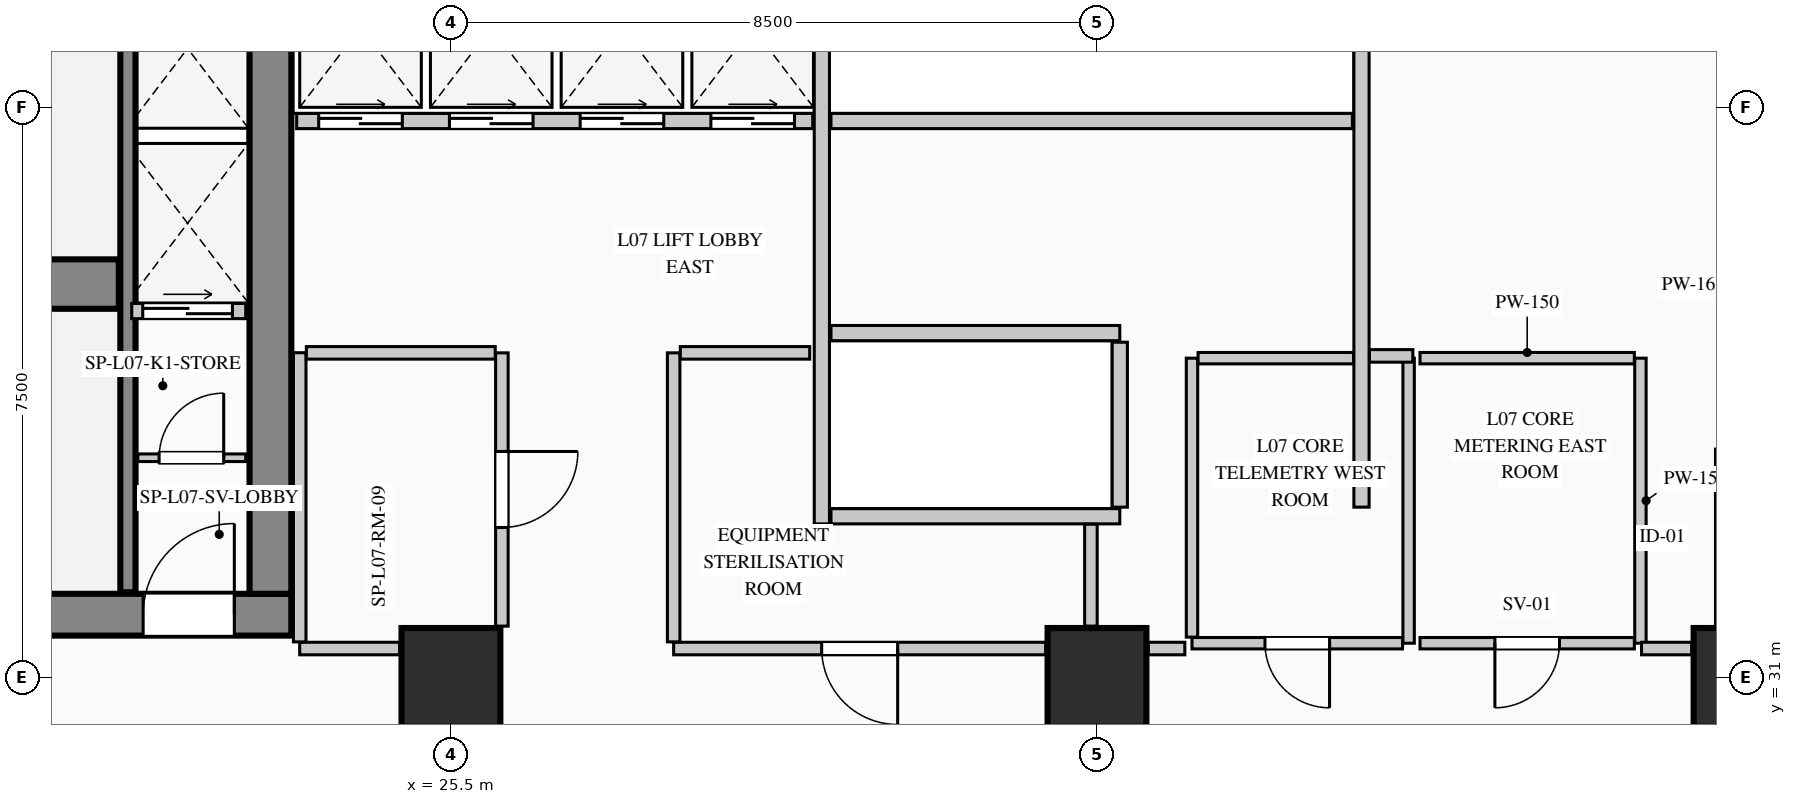
"""IFC4 building model, lengths in metres.
Left out: names, types, materials, properties, quantities, classifications, styles, units other than length and angle.
Written with IfcOpenShell. Run it as: python <this file> out.ifc"""

import sys

from ifc_helpers import new_model, si_unit, direction, frame, frame_2d, origin, origin_2d, place, context, subcontext, project, spatial, rectangle, extrude, element, fill, save


model = new_model("IFC4")
c1 = context("Model", 3, precision=1e-05, world=origin(), true_north=direction((0.0, 1.0)))
c2 = subcontext(c1, "Body", "Model", "MODEL_VIEW")
j1 = project(units=[si_unit("LENGTHUNIT", "METRE"), si_unit("PLANEANGLEUNIT", "RADIAN")], contexts=[c1])
p1 = place(None, origin())
s1 = spatial("IfcSite", under=j1, at=p1, CompositionType="ELEMENT")
p2 = place(p1, origin())
s2 = spatial("IfcBuilding", under=s1, at=p2, CompositionType="ELEMENT")
p3 = place(p2, frame((0.0, 0.0, 31.4)))
s3 = spatial("IfcBuildingStorey", under=s2, at=p3, CompositionType="ELEMENT", Elevation=31.4)
p4 = place(p3, frame((5.45, 31.825, 0.0), z_axis=(0.0, 0.0, 1.0), x_axis=(1.0, 0.0, 0.0)))
e1 = element("IfcWall", 1, at=p4, inside=s3, PredefinedType="SHEAR", context=c2, shape_type="SweptSolid", body=[
    extrude(rectangle(XDim=17.95, YDim=0.55, at=frame_2d((8.975, 0.0))), origin(), (0.0, 0.0, 1.0), 4.4),
])
p5 = place(p4, frame((3.2, 0.0, 0.0)))
e2 = element("IfcOpeningElement", 2, at=p5, cuts=e1, PredefinedType="OPENING", context=c2, shape_type="SweptSolid", body=[
    extrude(rectangle(XDim=1.2, YDim=2.2, at=frame_2d((0.6, 1.1))), frame((0.0, 0.285, 0.0), z_axis=(0.0, -1.0, 0.0), x_axis=(1.0, 0.0, 0.0)), (0.0, 0.0, 1.0), 0.57),
])
p6 = place(p4, frame((7.05, 0.0, 0.0)))
e3 = element("IfcOpeningElement", 3, at=p6, cuts=e1, PredefinedType="OPENING", context=c2, shape_type="SweptSolid", body=[
    extrude(rectangle(XDim=1.2, YDim=2.2, at=frame_2d((0.6, 1.1))), frame((0.0, 0.285, 0.0), z_axis=(0.0, -1.0, 0.0), x_axis=(1.0, 0.0, 0.0)), (0.0, 0.0, 1.0), 0.57),
])
p7 = place(p4, frame((8.9, 0.0, 0.0)))
e4 = element("IfcOpeningElement", 4, at=p7, cuts=e1, PredefinedType="OPENING", context=c2, shape_type="SweptSolid", body=[
    extrude(rectangle(XDim=1.15, YDim=2.2, at=frame_2d((0.575, 1.1))), frame((0.0, 0.285, 0.0), z_axis=(0.0, -1.0, 0.0), x_axis=(1.0, 0.0, 0.0)), (0.0, 0.0, 1.0), 0.57),
])
p8 = place(p4, frame((16.0, 0.0, 0.0)))
e5 = element("IfcOpeningElement", 5, at=p8, cuts=e1, PredefinedType="OPENING", context=c2, shape_type="SweptSolid", body=[
    extrude(rectangle(XDim=1.2, YDim=2.2, at=frame_2d((0.6, 1.1))), frame((0.0, 0.285, 0.0), z_axis=(0.0, -1.0, 0.0), x_axis=(1.0, 0.0, 0.0)), (0.0, 0.0, 1.0), 0.57),
])
p9 = place(p3, frame((23.125, 32.1, 0.0), z_axis=(0.0, 0.0, 1.0), x_axis=(0.0, 1.0, 0.0)))
e6 = element("IfcWall", 6, at=p9, inside=s3, PredefinedType="SHEAR", context=c2, shape_type="SweptSolid", body=[
    extrude(rectangle(XDim=8.3, YDim=0.55, at=frame_2d((4.15, 0.0))), origin(), (0.0, 0.0, 1.0), 4.4),
])
p10 = place(p3, frame((14.12, 36.175, 0.0), z_axis=(0.0, 0.0, 1.0), x_axis=(1.0, 0.0, 0.0)))
e7 = element("IfcWall", 7, at=p10, inside=s3, PredefinedType="SHEAR", context=c2, shape_type="SweptSolid", body=[
    extrude(rectangle(XDim=7.01, YDim=0.65, at=frame_2d((3.505, 0.0))), origin(), (0.0, 0.0, 1.0), 4.4),
])
p11 = place(p3, frame((21.25, 32.12, 0.0), z_axis=(0.0, 0.0, 1.0), x_axis=(0.0, 1.0, 0.0)))
e8 = element("IfcWall", 8, at=p11, inside=s3, PredefinedType="SHEAR", context=c2, shape_type="SweptSolid", body=[
    extrude(rectangle(XDim=8.26, YDim=0.2, at=frame_2d((4.13, 0.0))), origin(), (0.0, 0.0, 1.0), 4.4),
])
for number, where, z_axis, x_axis in (
    (9, (25.5, 31.0, 0.0), (0.0, 0.0, 1.0), (1.0, 0.0, 0.0)),
    (10, (34.0, 31.0, 0.0), (0.0, 0.0, 1.0), (1.0, 0.0, 0.0)),
    (11, (42.5, 31.0, 0.0), (0.0, 0.0, 1.0), (1.0, 0.0, 0.0)),
):
    element("IfcColumn", number, at=place(p3, frame(where, z_axis=z_axis, x_axis=x_axis)), inside=s3, PredefinedType="COLUMN", context=c2, shape_type="SweptSolid", body=[
        extrude(rectangle(XDim=1.3, YDim=1.3, at=origin_2d()), origin(), (0.0, 0.0, 1.0), 4.4),
    ])
p12 = place(p3, frame((21.38, 33.89, 0.0), z_axis=(0.0, 0.0, 1.0), x_axis=(1.0, 0.0, 0.0)))
e12 = element("IfcWall", 12, at=p12, inside=s3, PredefinedType="PARTITIONING", context=c2, shape_type="SweptSolid", body=[
    extrude(rectangle(XDim=1.42, YDim=0.1, at=frame_2d((0.71, 0.0))), origin(), (0.0, 0.0, 1.0), 4.1),
])
p13 = place(p12, frame((0.28, 0.0, 0.0)))
e13 = element("IfcOpeningElement", 13, at=p13, cuts=e12, PredefinedType="OPENING", context=c2, shape_type="SweptSolid", body=[
    extrude(rectangle(XDim=0.85, YDim=2.1, at=frame_2d((0.425, 1.05))), frame((0.0, 0.06, 0.0), z_axis=(0.0, -1.0, 0.0), x_axis=(1.0, 0.0, 0.0)), (0.0, 0.0, 1.0), 0.12),
])
p14 = place(p3, frame((21.3, 35.82, 0.0), z_axis=(0.0, 0.0, 1.0), x_axis=(1.0, 0.0, 0.0)))
e14 = element("IfcWall", 14, at=p14, inside=s3, PredefinedType="PARTITIONING", context=c2, shape_type="SweptSolid", body=[
    extrude(rectangle(XDim=1.5, YDim=0.2, at=frame_2d((0.75, 0.0))), origin(), (0.0, 0.0, 1.0), 4.1),
])
p15 = place(p14, frame((0.145, 0.0, 0.0)))
e15 = element("IfcOpeningElement", 15, at=p15, cuts=e14, PredefinedType="OPENING", context=c2, shape_type="SweptSolid", body=[
    extrude(rectangle(XDim=1.18, YDim=2.25, at=frame_2d((0.59, 1.125))), frame((0.0, 0.11, 0.0), z_axis=(0.0, -1.0, 0.0), x_axis=(1.0, 0.0, 0.0)), (0.0, 0.0, 1.0), 0.22),
])
p16 = place(p3, frame((30.38, 33.02, 0.0), z_axis=(0.0, 0.0, 1.0), x_axis=(0.0, 1.0, 0.0)))
e16 = element("IfcWall", 16, at=p16, inside=s3, PredefinedType="PARTITIONING", context=c2, shape_type="SweptSolid", body=[
    extrude(rectangle(XDim=7.64, YDim=0.2, at=frame_2d((3.82, 0.0))), origin(), (0.0, 0.0, 1.0), 4.1),
])
p17 = place(p3, frame((23.47, 38.32, 0.0), z_axis=(0.0, 0.0, 1.0), x_axis=(1.0, 0.0, 0.0)))
e17 = element("IfcWall", 17, at=p17, inside=s3, PredefinedType="PARTITIONING", context=c2, shape_type="SweptSolid", body=[
    extrude(rectangle(XDim=6.79, YDim=0.2, at=frame_2d((3.395, 0.0))), origin(), (0.0, 0.0, 1.0), 4.1),
])
p18 = place(p17, frame((0.29, 0.0, 0.0)))
e18 = element("IfcOpeningElement", 18, at=p18, cuts=e17, PredefinedType="OPENING", context=c2, shape_type="SweptSolid", body=[
    extrude(rectangle(XDim=1.1, YDim=2.2, at=frame_2d((0.55, 1.1))), frame((0.0, 0.11, 0.0), z_axis=(0.0, -1.0, 0.0), x_axis=(1.0, 0.0, 0.0)), (0.0, 0.0, 1.0), 0.22),
])
p19 = place(p17, frame((2.01, 0.0, 0.0)))
e19 = element("IfcOpeningElement", 19, at=p19, cuts=e17, PredefinedType="OPENING", context=c2, shape_type="SweptSolid", body=[
    extrude(rectangle(XDim=1.1, YDim=2.2, at=frame_2d((0.55, 1.1))), frame((0.0, 0.11, 0.0), z_axis=(0.0, -1.0, 0.0), x_axis=(1.0, 0.0, 0.0)), (0.0, 0.0, 1.0), 0.22),
])
p20 = place(p17, frame((3.73, 0.0, 0.0)))
e20 = element("IfcOpeningElement", 20, at=p20, cuts=e17, PredefinedType="OPENING", context=c2, shape_type="SweptSolid", body=[
    extrude(rectangle(XDim=1.1, YDim=2.2, at=frame_2d((0.55, 1.1))), frame((0.0, 0.11, 0.0), z_axis=(0.0, -1.0, 0.0), x_axis=(1.0, 0.0, 0.0)), (0.0, 0.0, 1.0), 0.22),
])
p21 = place(p17, frame((5.45, 0.0, 0.0)))
e21 = element("IfcOpeningElement", 21, at=p21, cuts=e17, PredefinedType="OPENING", context=c2, shape_type="SweptSolid", body=[
    extrude(rectangle(XDim=1.1, YDim=2.2, at=frame_2d((0.55, 1.1))), frame((0.0, 0.11, 0.0), z_axis=(0.0, -1.0, 0.0), x_axis=(1.0, 0.0, 0.0)), (0.0, 0.0, 1.0), 0.22),
])
p22 = place(p3, frame((37.48, 33.24, 0.0), z_axis=(0.0, 0.0, 1.0), x_axis=(0.0, 1.0, 0.0)))
e22 = element("IfcWall", 22, at=p22, inside=s3, PredefinedType="PARTITIONING", context=c2, shape_type="SweptSolid", body=[
    extrude(rectangle(XDim=7.42, YDim=0.2, at=frame_2d((3.71, 0.0))), origin(), (0.0, 0.0, 1.0), 4.1),
])
p23 = place(p3, frame((30.5, 38.32, 0.0), z_axis=(0.0, 0.0, 1.0), x_axis=(1.0, 0.0, 0.0)))
e23 = element("IfcWall", 23, at=p23, inside=s3, PredefinedType="PARTITIONING", context=c2, shape_type="SweptSolid", body=[
    extrude(rectangle(XDim=6.86, YDim=0.2, at=frame_2d((3.43, 0.0))), origin(), (0.0, 0.0, 1.0), 4.1),
])
for number, where, z_axis, x_axis in (
    (24, (30.5, 35.53, 0.0), (0.0, 0.0, 1.0), (1.0, 0.0, 0.0)),
    (25, (30.5, 33.12, 0.0), (0.0, 0.0, 1.0), (1.0, 0.0, 0.0)),
):
    element("IfcWall", number, at=place(p3, frame(where, z_axis=z_axis, x_axis=x_axis)), inside=s3, PredefinedType="PARTITIONING", context=c2, shape_type="SweptSolid", body=[
        extrude(rectangle(XDim=3.8, YDim=0.2, at=frame_2d((1.9, 0.0))), origin(), (0.0, 0.0, 1.0), 4.1),
    ])
p24 = place(p3, frame((34.3, 33.24, 0.0), z_axis=(0.0, 0.0, 1.0), x_axis=(0.0, 1.0, 0.0)))
e26 = element("IfcWall", 26, at=p24, inside=s3, PredefinedType="PARTITIONING", context=c2, shape_type="SweptSolid", body=[
    extrude(rectangle(XDim=2.17, YDim=0.2, at=frame_2d((1.085, 0.0))), origin(), (0.0, 0.0, 1.0), 4.1),
])
p25 = place(p3, frame((38.1, 35.2, 0.0), z_axis=(0.0, 0.0, 1.0), x_axis=(0.0, -1.0, 0.0)))
e27 = element("IfcWall", 27, at=p25, inside=s3, PredefinedType="PARTITIONING", context=c2, shape_type="SweptSolid", body=[
    extrude(rectangle(XDim=3.75, YDim=0.15, at=frame_2d((1.875, 0.0))), origin(), (0.0, 0.0, 1.0), 4.1),
])
p26 = place(p3, frame((38.02, 31.45, 0.0), z_axis=(0.0, 0.0, 1.0), x_axis=(-1.0, 0.0, 0.0)))
e28 = element("IfcWall", 28, at=p26, inside=s3, PredefinedType="PARTITIONING", context=c2, shape_type="SweptSolid", body=[
    extrude(rectangle(XDim=2.77, YDim=0.15, at=frame_2d((1.385, 0.0))), origin(), (0.0, 0.0, 1.0), 4.1),
])
p27 = place(p26, frame((0.96, 0.0, 0.0)))
e29 = element("IfcOpeningElement", 29, at=p27, cuts=e28, PredefinedType="OPENING", context=c2, shape_type="SweptSolid", body=[
    extrude(rectangle(XDim=0.85, YDim=2.1, at=frame_2d((0.425, 1.05))), frame((0.0, 0.085, 0.0), z_axis=(0.0, -1.0, 0.0), x_axis=(1.0, 0.0, 0.0)), (0.0, 0.0, 1.0), 0.17),
])
p28 = place(p3, frame((35.25, 31.53, 0.0), z_axis=(0.0, 0.0, 1.0), x_axis=(0.0, 1.0, 0.0)))
e30 = element("IfcWall", 30, at=p28, inside=s3, PredefinedType="PARTITIONING", context=c2, shape_type="SweptSolid", body=[
    extrude(rectangle(XDim=3.67, YDim=0.15, at=frame_2d((1.835, 0.0))), origin(), (0.0, 0.0, 1.0), 4.1),
])
p29 = place(p3, frame((35.33, 35.2, 0.0), z_axis=(0.0, 0.0, 1.0), x_axis=(1.0, 0.0, 0.0)))
e31 = element("IfcWall", 31, at=p29, inside=s3, PredefinedType="PARTITIONING", context=c2, shape_type="SweptSolid", body=[
    extrude(rectangle(XDim=2.045, YDim=0.15, at=frame_2d((1.022, 0.0))), origin(), (0.0, 0.0, 1.0), 4.1),
])
p30 = place(p3, frame((41.15, 35.2, 0.0), z_axis=(0.0, 0.0, 1.0), x_axis=(0.0, -1.0, 0.0)))
e32 = element("IfcWall", 32, at=p30, inside=s3, PredefinedType="PARTITIONING", context=c2, shape_type="SweptSolid", body=[
    extrude(rectangle(XDim=3.75, YDim=0.15, at=frame_2d((1.875, 0.0))), origin(), (0.0, 0.0, 1.0), 4.1),
])
p31 = place(p3, frame((41.07, 31.45, 0.0), z_axis=(0.0, 0.0, 1.0), x_axis=(-1.0, 0.0, 0.0)))
e33 = element("IfcWall", 33, at=p31, inside=s3, PredefinedType="PARTITIONING", context=c2, shape_type="SweptSolid", body=[
    extrude(rectangle(XDim=2.82, YDim=0.15, at=frame_2d((1.41, 0.0))), origin(), (0.0, 0.0, 1.0), 4.1),
])
p32 = place(p31, frame((0.985, 0.0, 0.0)))
e34 = element("IfcOpeningElement", 34, at=p32, cuts=e33, PredefinedType="OPENING", context=c2, shape_type="SweptSolid", body=[
    extrude(rectangle(XDim=0.85, YDim=2.1, at=frame_2d((0.425, 1.05))), frame((0.0, 0.085, 0.0), z_axis=(0.0, -1.0, 0.0), x_axis=(1.0, 0.0, 0.0)), (0.0, 0.0, 1.0), 0.17),
])
p33 = place(p3, frame((38.25, 35.2, 0.0), z_axis=(0.0, 0.0, 1.0), x_axis=(1.0, 0.0, 0.0)))
e35 = element("IfcWall", 35, at=p33, inside=s3, PredefinedType="PARTITIONING", context=c2, shape_type="SweptSolid", body=[
    extrude(rectangle(XDim=2.82, YDim=0.15, at=frame_2d((1.41, 0.0))), origin(), (0.0, 0.0, 1.0), 4.1),
])
p34 = place(p3, frame((33.92, 33.015, 0.0), z_axis=(0.0, 0.0, 1.0), x_axis=(0.0, -1.0, 0.0)))
e36 = element("IfcWall", 36, at=p34, inside=s3, PredefinedType="PARTITIONING", context=c2, shape_type="SweptSolid", body=[
    extrude(rectangle(XDim=1.34, YDim=0.165, at=frame_2d((0.67, 0.0))), origin(), (0.0, 0.0, 1.0), 4.1),
])
p35 = place(p3, frame((33.325, 31.38, 0.0), z_axis=(0.0, 0.0, 1.0), x_axis=(-1.0, 0.0, 0.0)))
e37 = element("IfcWall", 37, at=p35, inside=s3, PredefinedType="PARTITIONING", context=c2, shape_type="SweptSolid", body=[
    extrude(rectangle(XDim=4.895, YDim=0.165, at=frame_2d((2.448, 0.0))), origin(), (0.0, 0.0, 1.0), 4.1),
])
p36 = place(p35, frame((1.948, 0.0, 0.0)))
e38 = element("IfcOpeningElement", 38, at=p36, cuts=e37, PredefinedType="OPENING", context=c2, shape_type="SweptSolid", body=[
    extrude(rectangle(XDim=1.0, YDim=2.15, at=frame_2d((0.5, 1.075))), frame((0.0, 0.093, 0.0), z_axis=(0.0, -1.0, 0.0), x_axis=(1.0, 0.0, 0.0)), (0.0, 0.0, 1.0), 0.185),
])
p37 = place(p3, frame((28.43, 31.468, 0.0), z_axis=(0.0, 0.0, 1.0), x_axis=(0.0, 1.0, 0.0)))
e39 = element("IfcWall", 39, at=p37, inside=s3, PredefinedType="PARTITIONING", context=c2, shape_type="SweptSolid", body=[
    extrude(rectangle(XDim=3.802, YDim=0.165, at=frame_2d((1.901, 0.0))), origin(), (0.0, 0.0, 1.0), 4.1),
])
p38 = place(p3, frame((28.518, 35.27, 0.0), z_axis=(0.0, 0.0, 1.0), x_axis=(1.0, 0.0, 0.0)))
e40 = element("IfcWall", 40, at=p38, inside=s3, PredefinedType="PARTITIONING", context=c2, shape_type="SweptSolid", body=[
    extrude(rectangle(XDim=1.702, YDim=0.165, at=frame_2d((0.851, 0.0))), origin(), (0.0, 0.0, 1.0), 4.1),
])
p39 = place(p3, frame((26.17, 35.27, 0.0), z_axis=(0.0, 0.0, 1.0), x_axis=(0.0, -1.0, 0.0)))
e41 = element("IfcWall", 41, at=p39, inside=s3, PredefinedType="PARTITIONING", context=c2, shape_type="SweptSolid", body=[
    extrude(rectangle(XDim=3.595, YDim=0.165, at=frame_2d((1.797, 0.0))), origin(), (0.0, 0.0, 1.0), 4.1),
])
p40 = place(p39, frame((1.298, 0.0, 0.0)))
e42 = element("IfcOpeningElement", 42, at=p40, cuts=e41, PredefinedType="OPENING", context=c2, shape_type="SweptSolid", body=[
    extrude(rectangle(XDim=1.0, YDim=2.15, at=frame_2d((0.5, 1.075))), frame((0.0, 0.093, 0.0), z_axis=(0.0, -1.0, 0.0), x_axis=(1.0, 0.0, 0.0)), (0.0, 0.0, 1.0), 0.185),
])
p41 = place(p3, frame((24.825, 31.38, 0.0), z_axis=(0.0, 0.0, 1.0), x_axis=(-1.0, 0.0, 0.0)))
e43 = element("IfcWall", 43, at=p41, inside=s3, PredefinedType="PARTITIONING", context=c2, shape_type="SweptSolid", body=[
    extrude(rectangle(XDim=1.315, YDim=0.165, at=frame_2d((0.657, 0.0))), origin(), (0.0, 0.0, 1.0), 4.1),
])
p42 = place(p3, frame((23.51, 31.468, 0.0), z_axis=(0.0, 0.0, 1.0), x_axis=(0.0, 1.0, 0.0)))
e44 = element("IfcWall", 44, at=p42, inside=s3, PredefinedType="PARTITIONING", context=c2, shape_type="SweptSolid", body=[
    extrude(rectangle(XDim=3.804, YDim=0.165, at=frame_2d((1.902, 0.0))), origin(), (0.0, 0.0, 1.0), 4.1),
])
p43 = place(p3, frame((23.597, 35.27, 0.0), z_axis=(0.0, 0.0, 1.0), x_axis=(1.0, 0.0, 0.0)))
e45 = element("IfcWall", 45, at=p43, inside=s3, PredefinedType="PARTITIONING", context=c2, shape_type="SweptSolid", body=[
    extrude(rectangle(XDim=2.485, YDim=0.165, at=frame_2d((1.243, 0.0))), origin(), (0.0, 0.0, 1.0), 4.1),
])
p44 = place(p3, frame((42.22, 34.003, 0.0), z_axis=(0.0, 0.0, 1.0), x_axis=(0.0, -1.0, 0.0)))
e46 = element("IfcWall", 46, at=p44, inside=s3, PredefinedType="PARTITIONING", context=c2, shape_type="SweptSolid", body=[
    extrude(rectangle(XDim=2.328, YDim=0.165, at=frame_2d((1.164, 0.0))), origin(), (0.0, 0.0, 1.0), 4.1),
])
p45 = place(p44, frame((0.664, 0.0, 0.0)))
e47 = element("IfcOpeningElement", 47, at=p45, cuts=e46, PredefinedType="OPENING", context=c2, shape_type="SweptSolid", body=[
    extrude(rectangle(XDim=1.0, YDim=2.15, at=frame_2d((0.5, 1.075))), frame((0.0, 0.093, 0.0), z_axis=(0.0, -1.0, 0.0), x_axis=(1.0, 0.0, 0.0)), (0.0, 0.0, 1.0), 0.185),
])
p46 = place(p3, frame((41.825, 31.38, 0.0), z_axis=(0.0, 0.0, 1.0), x_axis=(-1.0, 0.0, 0.0)))
e48 = element("IfcWall", 48, at=p46, inside=s3, PredefinedType="PARTITIONING", context=c2, shape_type="SweptSolid", body=[
    extrude(rectangle(XDim=0.66, YDim=0.165, at=frame_2d((0.33, 0.0))), origin(), (0.0, 0.0, 1.0), 4.1),
])
p47 = place(p3, frame((38.156, 35.23, 0.0), z_axis=(0.0, 0.0, 1.0), x_axis=(-1.0, 0.0, 0.0)))
e49 = element("IfcWall", 49, at=p47, inside=s3, PredefinedType="PARTITIONING", context=c2, shape_type="SweptSolid", body=[
    extrude(rectangle(XDim=0.571, YDim=0.165, at=frame_2d((0.285, 0.0))), origin(), (0.0, 0.0, 1.0), 4.1),
])
p48 = place(p3, frame((35.156, 31.38, 0.0), z_axis=(0.0, 0.0, 1.0), x_axis=(-1.0, 0.0, 0.0)))
e50 = element("IfcWall", 50, at=p48, inside=s3, PredefinedType="PARTITIONING", context=c2, shape_type="SweptSolid", body=[
    extrude(rectangle(XDim=0.48, YDim=0.165, at=frame_2d((0.24, 0.0))), origin(), (0.0, 0.0, 1.0), 4.1),
])
p49 = place(p8, origin())
e51 = element("IfcDoor", 51, at=p49, inside=s3, OperationType="SINGLE_SWING_RIGHT", PredefinedType="DOOR", context=c2, shape_type="SweptSolid", body=[
    extrude(rectangle(XDim=1.2, YDim=2.2, at=frame_2d((0.6, 1.1))), frame((0.0, 0.025, 0.0), z_axis=(0.0, -1.0, 0.0), x_axis=(1.0, 0.0, 0.0)), (0.0, 0.0, 1.0), 0.05),
])
fill(e5, e51)
p50 = place(p13, origin())
e52 = element("IfcDoor", 52, at=p50, inside=s3, OperationType="SINGLE_SWING_RIGHT", PredefinedType="DOOR", context=c2, shape_type="SweptSolid", body=[
    extrude(rectangle(XDim=0.85, YDim=2.1, at=frame_2d((0.425, 1.05))), frame((0.0, 0.025, 0.0), z_axis=(0.0, -1.0, 0.0), x_axis=(1.0, 0.0, 0.0)), (0.0, 0.0, 1.0), 0.05),
])
fill(e13, e52)
p51 = place(p15, origin())
e53 = element("IfcDoor", 53, at=p51, inside=s3, OperationType="DOUBLE_DOOR_SLIDING", PredefinedType="DOOR", context=c2, shape_type="SweptSolid", body=[
    extrude(rectangle(XDim=1.18, YDim=2.25, at=frame_2d((0.59, 1.125))), frame((0.0, 0.025, 0.0), z_axis=(0.0, -1.0, 0.0), x_axis=(1.0, 0.0, 0.0)), (0.0, 0.0, 1.0), 0.05),
])
fill(e15, e53)
p52 = place(p18, origin())
e54 = element("IfcDoor", 54, at=p52, inside=s3, OperationType="DOUBLE_DOOR_SLIDING", PredefinedType="DOOR", context=c2, shape_type="SweptSolid", body=[
    extrude(rectangle(XDim=1.1, YDim=2.2, at=frame_2d((0.55, 1.1))), frame((0.0, 0.025, 0.0), z_axis=(0.0, -1.0, 0.0), x_axis=(1.0, 0.0, 0.0)), (0.0, 0.0, 1.0), 0.05),
])
fill(e18, e54)
p53 = place(p19, origin())
e55 = element("IfcDoor", 55, at=p53, inside=s3, OperationType="DOUBLE_DOOR_SLIDING", PredefinedType="DOOR", context=c2, shape_type="SweptSolid", body=[
    extrude(rectangle(XDim=1.1, YDim=2.2, at=frame_2d((0.55, 1.1))), frame((0.0, 0.025, 0.0), z_axis=(0.0, -1.0, 0.0), x_axis=(1.0, 0.0, 0.0)), (0.0, 0.0, 1.0), 0.05),
])
fill(e19, e55)
p54 = place(p20, origin())
e56 = element("IfcDoor", 56, at=p54, inside=s3, OperationType="DOUBLE_DOOR_SLIDING", PredefinedType="DOOR", context=c2, shape_type="SweptSolid", body=[
    extrude(rectangle(XDim=1.1, YDim=2.2, at=frame_2d((0.55, 1.1))), frame((0.0, 0.025, 0.0), z_axis=(0.0, -1.0, 0.0), x_axis=(1.0, 0.0, 0.0)), (0.0, 0.0, 1.0), 0.05),
])
fill(e20, e56)
p55 = place(p21, origin())
e57 = element("IfcDoor", 57, at=p55, inside=s3, OperationType="DOUBLE_DOOR_SLIDING", PredefinedType="DOOR", context=c2, shape_type="SweptSolid", body=[
    extrude(rectangle(XDim=1.1, YDim=2.2, at=frame_2d((0.55, 1.1))), frame((0.0, 0.025, 0.0), z_axis=(0.0, -1.0, 0.0), x_axis=(1.0, 0.0, 0.0)), (0.0, 0.0, 1.0), 0.05),
])
fill(e21, e57)
p56 = place(p27, origin())
e58 = element("IfcDoor", 58, at=p56, inside=s3, OperationType="SINGLE_SWING_LEFT", PredefinedType="DOOR", context=c2, shape_type="SweptSolid", body=[
    extrude(rectangle(XDim=0.85, YDim=2.1, at=frame_2d((0.425, 1.05))), frame((0.0, 0.025, 0.0), z_axis=(0.0, -1.0, 0.0), x_axis=(1.0, 0.0, 0.0)), (0.0, 0.0, 1.0), 0.05),
])
fill(e29, e58)
p57 = place(p32, origin())
e59 = element("IfcDoor", 59, at=p57, inside=s3, OperationType="SINGLE_SWING_RIGHT", PredefinedType="DOOR", context=c2, shape_type="SweptSolid", body=[
    extrude(rectangle(XDim=0.85, YDim=2.1, at=frame_2d((0.425, 1.05))), frame((0.0, 0.025, 0.0), z_axis=(0.0, -1.0, 0.0), x_axis=(1.0, 0.0, 0.0)), (0.0, 0.0, 1.0), 0.05),
])
fill(e34, e59)
p58 = place(p36, origin())
e60 = element("IfcDoor", 60, at=p58, inside=s3, OperationType="SINGLE_SWING_LEFT", PredefinedType="DOOR", context=c2, shape_type="SweptSolid", body=[
    extrude(rectangle(XDim=1.0, YDim=2.15, at=frame_2d((0.5, 1.075))), frame((0.0, 0.025, 0.0), z_axis=(0.0, -1.0, 0.0), x_axis=(1.0, 0.0, 0.0)), (0.0, 0.0, 1.0), 0.05),
])
fill(e38, e60)
p59 = place(p40, origin())
e61 = element("IfcDoor", 61, at=p59, inside=s3, OperationType="SINGLE_SWING_LEFT", PredefinedType="DOOR", context=c2, shape_type="SweptSolid", body=[
    extrude(rectangle(XDim=1.0, YDim=2.15, at=frame_2d((0.5, 1.075))), frame((0.0, 0.025, 0.0), z_axis=(0.0, -1.0, 0.0), x_axis=(1.0, 0.0, 0.0)), (0.0, 0.0, 1.0), 0.05),
])
fill(e42, e61)
save(model, sys.argv[1])
